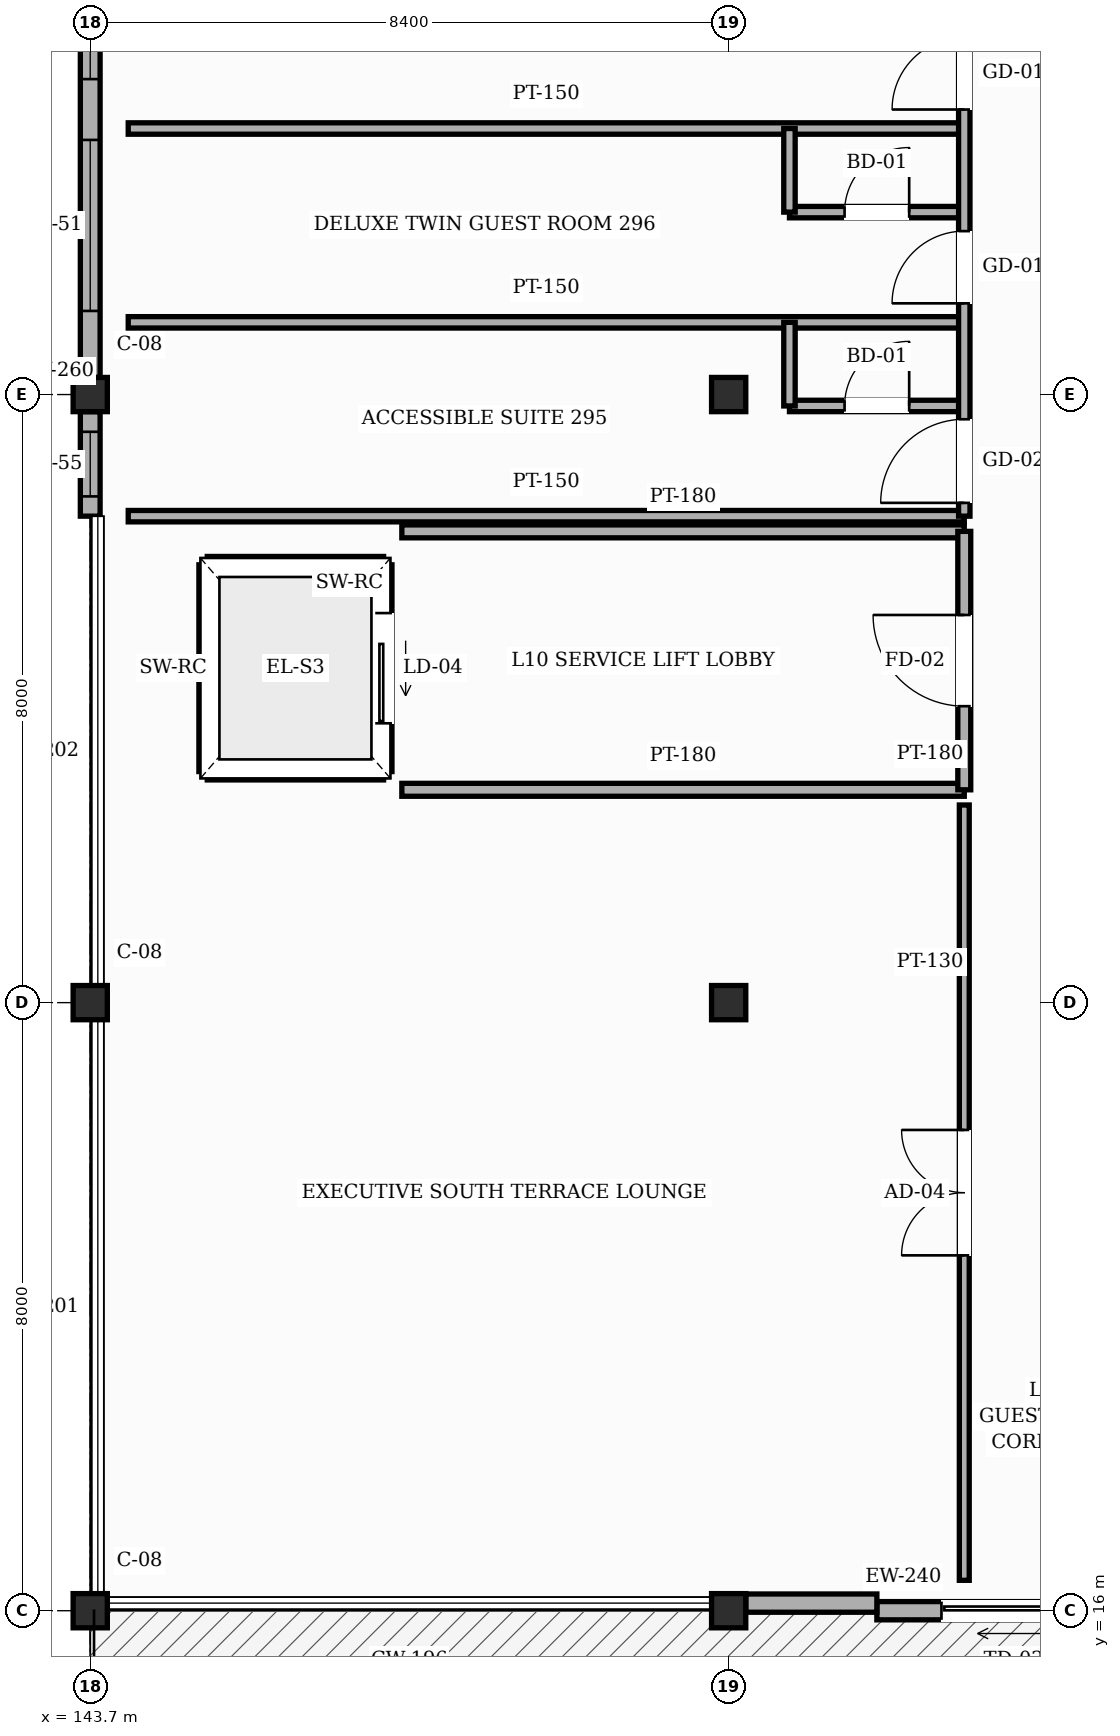
"""IFC4 building model, lengths in metres.
Left out: names, types, materials, properties, quantities, classifications, styles, units other than length and angle.
Written with IfcOpenShell. Run it as: python <this file> out.ifc"""

import sys

from ifc_helpers import new_model, si_unit, direction, frame, frame_2d, origin, origin_2d, place, context, subcontext, project, spatial, rectangle, hollow_rectangle, extrude, element, fill, save


model = new_model("IFC4")
c1 = context("Model", 3, precision=1e-05, world=origin(), true_north=direction((0.0, 1.0)))
c2 = subcontext(c1, "Body", "Model", "MODEL_VIEW")
j1 = project(units=[si_unit("LENGTHUNIT", "METRE"), si_unit("PLANEANGLEUNIT", "RADIAN")], contexts=[c1])
p1 = place(None, origin())
s1 = spatial("IfcSite", under=j1, at=p1, CompositionType="ELEMENT")
p2 = place(p1, origin())
s2 = spatial("IfcBuilding", under=s1, at=p2, CompositionType="ELEMENT")
p3 = place(p2, frame((0.0, 0.0, 42.6)))
s3 = spatial("IfcBuildingStorey", under=s2, at=p3, CompositionType="ELEMENT", Elevation=42.6)
for number, where, z_axis, x_axis in (
    (1, (143.7, 16.0, 0.0), (0.0, 0.0, 1.0), (1.0, 0.0, 0.0)),
    (2, (143.7, 24.0, 0.0), (0.0, 0.0, 1.0), (1.0, 0.0, 0.0)),
    (3, (143.7, 32.0, 0.0), (0.0, 0.0, 1.0), (1.0, 0.0, 0.0)),
    (4, (152.1, 16.0, 0.0), (0.0, 0.0, 1.0), (1.0, 0.0, 0.0)),
    (5, (152.1, 24.0, 0.0), (0.0, 0.0, 1.0), (1.0, 0.0, 0.0)),
    (6, (152.1, 32.0, 0.0), (0.0, 0.0, 1.0), (1.0, 0.0, 0.0)),
):
    element("IfcColumn", number, at=place(p3, frame(where, z_axis=z_axis, x_axis=x_axis)), inside=s3, PredefinedType="COLUMN", context=c2, shape_type="SweptSolid", body=[
        extrude(hollow_rectangle(XDim=0.45, YDim=0.45, WallThickness=0.019, InnerFilletRadius=0.019, OuterFilletRadius=0.038, at=origin_2d()), origin(), (0.0, 0.0, 1.0), 3.6),
    ])
p4 = place(p3, frame((143.7, 30.4, 0.0), z_axis=(0.0, 0.0, 1.0), x_axis=(0.0, 1.0, 0.0)))
e7 = element("IfcWall", 7, at=p4, inside=s3, PredefinedType="SOLIDWALL", context=c2, shape_type="SweptSolid", body=[
    extrude(rectangle(XDim=1.375, YDim=0.26, at=frame_2d((0.688, 0.0))), origin(), (0.0, 0.0, 1.0), 2.805),
])
p5 = place(p4, frame((0.26, 0.0, 0.85)))
e8 = element("IfcOpeningElement", 8, at=p5, cuts=e7, PredefinedType="OPENING", context=c2, shape_type="SweptSolid", body=[
    extrude(rectangle(XDim=0.85, YDim=1.35, at=frame_2d((0.425, 0.675))), frame((0.0, 0.14, 0.0), z_axis=(0.0, -1.0, 0.0), x_axis=(1.0, 0.0, 0.0)), (0.0, 0.0, 1.0), 0.28),
])
p6 = place(p3, frame((143.7, 32.225, 0.0), z_axis=(0.0, 0.0, 1.0), x_axis=(0.0, 1.0, 0.0)))
e9 = element("IfcWall", 9, at=p6, inside=s3, PredefinedType="SOLIDWALL", context=c2, shape_type="SweptSolid", body=[
    extrude(rectangle(XDim=8.45, YDim=0.26, at=frame_2d((4.225, 0.0))), origin(), (0.0, 0.0, 1.0), 2.655),
])
p7 = place(p6, frame((0.875, 0.0, 0.85)))
e10 = element("IfcOpeningElement", 10, at=p7, cuts=e9, PredefinedType="OPENING", context=c2, shape_type="SweptSolid", body=[
    extrude(rectangle(XDim=2.25, YDim=1.35, at=frame_2d((1.125, 0.675))), frame((0.0, 0.14, 0.0), z_axis=(0.0, -1.0, 0.0), x_axis=(1.0, 0.0, 0.0)), (0.0, 0.0, 1.0), 0.28),
])
p8 = place(p6, frame((3.925, 0.0, 0.85)))
e11 = element("IfcOpeningElement", 11, at=p8, cuts=e9, PredefinedType="OPENING", context=c2, shape_type="SweptSolid", body=[
    extrude(rectangle(XDim=1.25, YDim=1.35, at=frame_2d((0.625, 0.675))), frame((0.0, 0.14, 0.0), z_axis=(0.0, -1.0, 0.0), x_axis=(1.0, 0.0, 0.0)), (0.0, 0.0, 1.0), 0.28),
])
p9 = place(p6, frame((6.375, 0.0, 0.85)))
e12 = element("IfcOpeningElement", 12, at=p9, cuts=e9, PredefinedType="OPENING", context=c2, shape_type="SweptSolid", body=[
    extrude(rectangle(XDim=1.45, YDim=1.35, at=frame_2d((0.725, 0.675))), frame((0.0, 0.14, 0.0), z_axis=(0.0, -1.0, 0.0), x_axis=(1.0, 0.0, 0.0)), (0.0, 0.0, 1.0), 0.28),
])
p10 = place(p3, frame((154.05, 16.0, 0.0), z_axis=(0.0, 0.0, 1.0), x_axis=(1.0, 0.0, 0.0)))
e13 = element("IfcWall", 13, at=p10, inside=s3, PredefinedType="SOLIDWALL", context=c2, shape_type="SweptSolid", body=[
    extrude(rectangle(XDim=3.6, YDim=0.24, at=frame_2d((1.8, 0.0))), origin(), (0.0, 0.0, 1.0), 2.755),
])
p11 = place(p10, frame((0.85, 0.0, 0.0)))
e14 = element("IfcOpeningElement", 14, at=p11, cuts=e13, PredefinedType="OPENING", context=c2, shape_type="SweptSolid", body=[
    extrude(rectangle(XDim=1.9, YDim=2.35, at=frame_2d((0.95, 1.175))), frame((0.0, 0.13, 0.0), z_axis=(0.0, -1.0, 0.0), x_axis=(1.0, 0.0, 0.0)), (0.0, 0.0, 1.0), 0.26),
])
p12 = place(p3, frame((154.05, 16.1, 0.0), z_axis=(0.0, 0.0, 1.0), x_axis=(-1.0, 0.0, 0.0)))
e15 = element("IfcWall", 15, at=p12, inside=s3, PredefinedType="SOLIDWALL", context=c2, shape_type="SweptSolid", body=[
    extrude(rectangle(XDim=1.725, YDim=0.24, at=frame_2d((0.863, 0.0))), origin(), (0.0, 0.0, 1.0), 2.755),
])
for number, where, z_axis, x_axis in (
    (16, (145.24, 29.76, 0.0), (0.0, 0.0, 1.0), (1.0, 0.0, 0.0)),
    (17, (145.24, 27.04, 0.0), (0.0, 0.0, 1.0), (1.0, 0.0, 0.0)),
):
    element("IfcWall", number, at=place(p3, frame(where, z_axis=z_axis, x_axis=x_axis)), inside=s3, PredefinedType="SHEAR", context=c2, shape_type="SweptSolid", body=[
        extrude(rectangle(XDim=2.32, YDim=0.22, at=frame_2d((1.16, 0.0))), origin(), (0.0, 0.0, 1.0), 3.38),
    ])
p13 = place(p3, frame((147.56, 27.04, 0.0), z_axis=(0.0, 0.0, 1.0), x_axis=(0.0, 1.0, 0.0)))
e18 = element("IfcWall", 18, at=p13, inside=s3, PredefinedType="SHEAR", context=c2, shape_type="SweptSolid", body=[
    extrude(rectangle(XDim=2.72, YDim=0.22, at=frame_2d((1.36, 0.0))), origin(), (0.0, 0.0, 1.0), 3.38),
])
p14 = place(p13, frame((0.635, 0.0, 0.0)))
e19 = element("IfcOpeningElement", 19, at=p14, cuts=e18, PredefinedType="OPENING", context=c2, shape_type="SweptSolid", body=[
    extrude(rectangle(XDim=1.45, YDim=2.35, at=frame_2d((0.725, 1.175))), frame((0.0, 0.12, 0.0), z_axis=(0.0, -1.0, 0.0), x_axis=(1.0, 0.0, 0.0)), (0.0, 0.0, 1.0), 0.24),
])
p15 = place(p3, frame((145.24, 27.04, 0.0), z_axis=(0.0, 0.0, 1.0), x_axis=(0.0, 1.0, 0.0)))
e20 = element("IfcWall", 20, at=p15, inside=s3, PredefinedType="SHEAR", context=c2, shape_type="SweptSolid", body=[
    extrude(rectangle(XDim=2.72, YDim=0.22, at=frame_2d((1.36, 0.0))), origin(), (0.0, 0.0, 1.0), 3.38),
])
for number, where, z_axis, x_axis in (
    (21, (147.8, 26.8, 0.0), (0.0, 0.0, 1.0), (1.0, 0.0, 0.0)),
    (22, (147.8, 30.2, 0.0), (0.0, 0.0, 1.0), (1.0, 0.0, 0.0)),
):
    element("IfcWall", number, at=place(p3, frame(where, z_axis=z_axis, x_axis=x_axis)), inside=s3, PredefinedType="PARTITIONING", context=c2, shape_type="SweptSolid", body=[
        extrude(rectangle(XDim=7.4, YDim=0.17, at=frame_2d((3.7, 0.0))), origin(), (0.0, 0.0, 1.0), 3.365),
    ])
p16 = place(p3, frame((144.2, 30.4, 0.0), z_axis=(0.0, 0.0, 1.0), x_axis=(1.0, 0.0, 0.0)))
e23 = element("IfcWall", 23, at=p16, inside=s3, PredefinedType="PARTITIONING", context=c2, shape_type="SweptSolid", body=[
    extrude(rectangle(XDim=11.0, YDim=0.15, at=frame_2d((5.5, 0.0))), origin(), (0.0, 0.0, 1.0), 3.365),
])
p17 = place(p3, frame((152.9, 31.85, 0.0), z_axis=(0.0, 0.0, 1.0), x_axis=(1.0, 0.0, 0.0)))
e24 = element("IfcWall", 24, at=p17, inside=s3, PredefinedType="PARTITIONING", context=c2, shape_type="SweptSolid", body=[
    extrude(rectangle(XDim=2.3, YDim=0.15, at=frame_2d((1.15, 0.0))), origin(), (0.0, 0.0, 1.0), 2.755),
])
p18 = place(p17, frame((0.725, 0.0, 0.0)))
e25 = element("IfcOpeningElement", 25, at=p18, cuts=e24, PredefinedType="OPENING", context=c2, shape_type="SweptSolid", body=[
    extrude(rectangle(XDim=0.85, YDim=2.1, at=frame_2d((0.425, 1.05))), frame((0.0, 0.085, 0.0), z_axis=(0.0, -1.0, 0.0), x_axis=(1.0, 0.0, 0.0)), (0.0, 0.0, 1.0), 0.17),
])
p19 = place(p3, frame((144.2, 32.95, 0.0), z_axis=(0.0, 0.0, 1.0), x_axis=(1.0, 0.0, 0.0)))
e26 = element("IfcWall", 26, at=p19, inside=s3, PredefinedType="PARTITIONING", context=c2, shape_type="SweptSolid", body=[
    extrude(rectangle(XDim=11.0, YDim=0.15, at=frame_2d((5.5, 0.0))), origin(), (0.0, 0.0, 1.0), 3.365),
])
p20 = place(p3, frame((152.9, 34.4, 0.0), z_axis=(0.0, 0.0, 1.0), x_axis=(1.0, 0.0, 0.0)))
e27 = element("IfcWall", 27, at=p20, inside=s3, PredefinedType="PARTITIONING", context=c2, shape_type="SweptSolid", body=[
    extrude(rectangle(XDim=2.3, YDim=0.15, at=frame_2d((1.15, 0.0))), origin(), (0.0, 0.0, 1.0), 3.365),
])
p21 = place(p20, frame((0.725, 0.0, 0.0)))
e28 = element("IfcOpeningElement", 28, at=p21, cuts=e27, PredefinedType="OPENING", context=c2, shape_type="SweptSolid", body=[
    extrude(rectangle(XDim=0.85, YDim=2.1, at=frame_2d((0.425, 1.05))), frame((0.0, 0.085, 0.0), z_axis=(0.0, -1.0, 0.0), x_axis=(1.0, 0.0, 0.0)), (0.0, 0.0, 1.0), 0.17),
])
p22 = place(p3, frame((144.2, 35.5, 0.0), z_axis=(0.0, 0.0, 1.0), x_axis=(1.0, 0.0, 0.0)))
e29 = element("IfcWall", 29, at=p22, inside=s3, PredefinedType="PARTITIONING", context=c2, shape_type="SweptSolid", body=[
    extrude(rectangle(XDim=11.0, YDim=0.15, at=frame_2d((5.5, 0.0))), origin(), (0.0, 0.0, 1.0), 3.365),
])
p23 = place(p3, frame((152.9, 31.85, 0.0), z_axis=(0.0, 0.0, 1.0), x_axis=(0.0, 1.0, 0.0)))
e30 = element("IfcWall", 30, at=p23, inside=s3, PredefinedType="PARTITIONING", context=c2, shape_type="SweptSolid", body=[
    extrude(rectangle(XDim=1.1, YDim=0.15, at=frame_2d((0.55, 0.0))), origin(), (0.0, 0.0, 1.0), 3.365),
])
p24 = place(p3, frame((152.9, 34.4, 0.0), z_axis=(0.0, 0.0, 1.0), x_axis=(0.0, 1.0, 0.0)))
e31 = element("IfcWall", 31, at=p24, inside=s3, PredefinedType="PARTITIONING", context=c2, shape_type="SweptSolid", body=[
    extrude(rectangle(XDim=1.1, YDim=0.15, at=frame_2d((0.55, 0.0))), origin(), (0.0, 0.0, 1.0), 3.365),
])
p25 = place(p3, frame((155.2, 16.4, 0.0), z_axis=(0.0, 0.0, 1.0), x_axis=(0.0, 1.0, 0.0)))
e32 = element("IfcWall", 32, at=p25, inside=s3, PredefinedType="PARTITIONING", context=c2, shape_type="SweptSolid", body=[
    extrude(rectangle(XDim=10.2, YDim=0.13, at=frame_2d((5.1, 0.0))), origin(), (0.0, 0.0, 1.0), 3.365),
])
p26 = place(p25, frame((4.275, 0.0, 0.0)))
e33 = element("IfcOpeningElement", 33, at=p26, cuts=e32, PredefinedType="OPENING", context=c2, shape_type="SweptSolid", body=[
    extrude(rectangle(XDim=1.65, YDim=2.35, at=frame_2d((0.825, 1.175))), frame((0.0, 0.075, 0.0), z_axis=(0.0, -1.0, 0.0), x_axis=(1.0, 0.0, 0.0)), (0.0, 0.0, 1.0), 0.15),
])
p27 = place(p3, frame((155.2, 26.8, 0.0), z_axis=(0.0, 0.0, 1.0), x_axis=(0.0, 1.0, 0.0)))
e34 = element("IfcWall", 34, at=p27, inside=s3, PredefinedType="PARTITIONING", context=c2, shape_type="SweptSolid", body=[
    extrude(rectangle(XDim=3.4, YDim=0.17, at=frame_2d((1.7, 0.0))), origin(), (0.0, 0.0, 1.0), 3.365),
])
p28 = place(p27, frame((1.1, 0.0, 0.0)))
e35 = element("IfcOpeningElement", 35, at=p28, cuts=e34, PredefinedType="OPENING", context=c2, shape_type="SweptSolid", body=[
    extrude(rectangle(XDim=1.2, YDim=2.2, at=frame_2d((0.6, 1.1))), frame((0.0, 0.095, 0.0), z_axis=(0.0, -1.0, 0.0), x_axis=(1.0, 0.0, 0.0)), (0.0, 0.0, 1.0), 0.19),
])
p29 = place(p3, frame((155.2, 30.4, 0.0), z_axis=(0.0, 0.0, 1.0), x_axis=(0.0, 1.0, 0.0)))
e36 = element("IfcWall", 36, at=p29, inside=s3, PredefinedType="PARTITIONING", context=c2, shape_type="SweptSolid", body=[
    extrude(rectangle(XDim=10.2, YDim=0.15, at=frame_2d((5.1, 0.0))), origin(), (0.0, 0.0, 1.0), 3.365),
])
p30 = place(p29, frame((0.175, 0.0, 0.0)))
e37 = element("IfcOpeningElement", 37, at=p30, cuts=e36, PredefinedType="OPENING", context=c2, shape_type="SweptSolid", body=[
    extrude(rectangle(XDim=1.1, YDim=2.2, at=frame_2d((0.55, 1.1))), frame((0.0, 0.085, 0.0), z_axis=(0.0, -1.0, 0.0), x_axis=(1.0, 0.0, 0.0)), (0.0, 0.0, 1.0), 0.17),
])
p31 = place(p29, frame((2.8, 0.0, 0.0)))
e38 = element("IfcOpeningElement", 38, at=p31, cuts=e36, PredefinedType="OPENING", context=c2, shape_type="SweptSolid", body=[
    extrude(rectangle(XDim=0.95, YDim=2.15, at=frame_2d((0.475, 1.075))), frame((0.0, 0.085, 0.0), z_axis=(0.0, -1.0, 0.0), x_axis=(1.0, 0.0, 0.0)), (0.0, 0.0, 1.0), 0.17),
])
p32 = place(p29, frame((5.35, 0.0, 0.0)))
e39 = element("IfcOpeningElement", 39, at=p32, cuts=e36, PredefinedType="OPENING", context=c2, shape_type="SweptSolid", body=[
    extrude(rectangle(XDim=0.95, YDim=2.15, at=frame_2d((0.475, 1.075))), frame((0.0, 0.085, 0.0), z_axis=(0.0, -1.0, 0.0), x_axis=(1.0, 0.0, 0.0)), (0.0, 0.0, 1.0), 0.17),
])
p33 = place(p29, frame((7.9, 0.0, 0.0)))
e40 = element("IfcOpeningElement", 40, at=p33, cuts=e36, PredefinedType="OPENING", context=c2, shape_type="SweptSolid", body=[
    extrude(rectangle(XDim=0.95, YDim=2.15, at=frame_2d((0.475, 1.075))), frame((0.0, 0.085, 0.0), z_axis=(0.0, -1.0, 0.0), x_axis=(1.0, 0.0, 0.0)), (0.0, 0.0, 1.0), 0.17),
])
p34 = place(p5, origin())
e41 = element("IfcWindow", 41, at=p34, inside=s3, PartitioningType="SINGLE_PANEL", PredefinedType="WINDOW", context=c2, shape_type="SweptSolid", body=[
    extrude(rectangle(XDim=0.85, YDim=1.35, at=frame_2d((0.425, 0.675))), frame((0.0, 0.03, 0.0), z_axis=(0.0, -1.0, 0.0), x_axis=(1.0, 0.0, 0.0)), (0.0, 0.0, 1.0), 0.06),
])
fill(e8, e41)
p35 = place(p7, origin())
e42 = element("IfcWindow", 42, at=p35, inside=s3, PartitioningType="SINGLE_PANEL", PredefinedType="WINDOW", context=c2, shape_type="SweptSolid", body=[
    extrude(rectangle(XDim=2.25, YDim=1.35, at=frame_2d((1.125, 0.675))), frame((0.0, 0.03, 0.0), z_axis=(0.0, -1.0, 0.0), x_axis=(1.0, 0.0, 0.0)), (0.0, 0.0, 1.0), 0.06),
])
fill(e10, e42)
p36 = place(p8, origin())
e43 = element("IfcWindow", 43, at=p36, inside=s3, PartitioningType="SINGLE_PANEL", PredefinedType="WINDOW", context=c2, shape_type="SweptSolid", body=[
    extrude(rectangle(XDim=1.25, YDim=1.35, at=frame_2d((0.625, 0.675))), frame((0.0, 0.03, 0.0), z_axis=(0.0, -1.0, 0.0), x_axis=(1.0, 0.0, 0.0)), (0.0, 0.0, 1.0), 0.06),
])
fill(e11, e43)
p37 = place(p11, origin())
e44 = element("IfcDoor", 44, at=p37, inside=s3, OperationType="SLIDING_TO_LEFT", PredefinedType="DOOR", context=c2, shape_type="SweptSolid", body=[
    extrude(rectangle(XDim=1.9, YDim=2.35, at=frame_2d((0.95, 1.175))), frame((0.0, 0.025, 0.0), z_axis=(0.0, -1.0, 0.0), x_axis=(1.0, 0.0, 0.0)), (0.0, 0.0, 1.0), 0.05),
])
fill(e14, e44)
p38 = place(p14, origin())
e45 = element("IfcDoor", 45, at=p38, inside=s3, OperationType="SLIDING_TO_LEFT", PredefinedType="DOOR", context=c2, shape_type="SweptSolid", body=[
    extrude(rectangle(XDim=1.45, YDim=2.35, at=frame_2d((0.725, 1.175))), frame((0.0, 0.025, 0.0), z_axis=(0.0, -1.0, 0.0), x_axis=(1.0, 0.0, 0.0)), (0.0, 0.0, 1.0), 0.05),
])
fill(e19, e45)
p39 = place(p28, origin())
e46 = element("IfcDoor", 46, at=p39, inside=s3, OperationType="SINGLE_SWING_RIGHT", PredefinedType="DOOR", context=c2, shape_type="SweptSolid", body=[
    extrude(rectangle(XDim=1.2, YDim=2.2, at=frame_2d((0.6, 1.1))), frame((0.0, 0.025, 0.0), z_axis=(0.0, -1.0, 0.0), x_axis=(1.0, 0.0, 0.0)), (0.0, 0.0, 1.0), 0.05),
])
fill(e35, e46)
p40 = place(p26, origin())
e47 = element("IfcDoor", 47, at=p40, inside=s3, OperationType="DOUBLE_DOOR_SINGLE_SWING", PredefinedType="DOOR", context=c2, shape_type="SweptSolid", body=[
    extrude(rectangle(XDim=1.65, YDim=2.35, at=frame_2d((0.825, 1.175))), frame((0.0, 0.025, 0.0), z_axis=(0.0, -1.0, 0.0), x_axis=(1.0, 0.0, 0.0)), (0.0, 0.0, 1.0), 0.05),
])
fill(e33, e47)
p41 = place(p30, origin())
e48 = element("IfcDoor", 48, at=p41, inside=s3, OperationType="SINGLE_SWING_LEFT", PredefinedType="DOOR", context=c2, shape_type="SweptSolid", body=[
    extrude(rectangle(XDim=1.1, YDim=2.2, at=frame_2d((0.55, 1.1))), frame((0.0, 0.025, 0.0), z_axis=(0.0, -1.0, 0.0), x_axis=(1.0, 0.0, 0.0)), (0.0, 0.0, 1.0), 0.05),
])
fill(e37, e48)
p42 = place(p18, origin())
e49 = element("IfcDoor", 49, at=p42, inside=s3, OperationType="SINGLE_SWING_RIGHT", PredefinedType="DOOR", context=c2, shape_type="SweptSolid", body=[
    extrude(rectangle(XDim=0.85, YDim=2.1, at=frame_2d((0.425, 1.05))), frame((0.0, 0.025, 0.0), z_axis=(0.0, -1.0, 0.0), x_axis=(1.0, 0.0, 0.0)), (0.0, 0.0, 1.0), 0.05),
])
fill(e25, e49)
p43 = place(p31, origin())
e50 = element("IfcDoor", 50, at=p43, inside=s3, OperationType="SINGLE_SWING_LEFT", PredefinedType="DOOR", context=c2, shape_type="SweptSolid", body=[
    extrude(rectangle(XDim=0.95, YDim=2.15, at=frame_2d((0.475, 1.075))), frame((0.0, 0.025, 0.0), z_axis=(0.0, -1.0, 0.0), x_axis=(1.0, 0.0, 0.0)), (0.0, 0.0, 1.0), 0.05),
])
fill(e38, e50)
p44 = place(p21, origin())
e51 = element("IfcDoor", 51, at=p44, inside=s3, OperationType="SINGLE_SWING_RIGHT", PredefinedType="DOOR", context=c2, shape_type="SweptSolid", body=[
    extrude(rectangle(XDim=0.85, YDim=2.1, at=frame_2d((0.425, 1.05))), frame((0.0, 0.025, 0.0), z_axis=(0.0, -1.0, 0.0), x_axis=(1.0, 0.0, 0.0)), (0.0, 0.0, 1.0), 0.05),
])
fill(e28, e51)
p45 = place(p32, origin())
e52 = element("IfcDoor", 52, at=p45, inside=s3, OperationType="SINGLE_SWING_LEFT", PredefinedType="DOOR", context=c2, shape_type="SweptSolid", body=[
    extrude(rectangle(XDim=0.95, YDim=2.15, at=frame_2d((0.475, 1.075))), frame((0.0, 0.025, 0.0), z_axis=(0.0, -1.0, 0.0), x_axis=(1.0, 0.0, 0.0)), (0.0, 0.0, 1.0), 0.05),
])
fill(e39, e52)
save(model, sys.argv[1])
